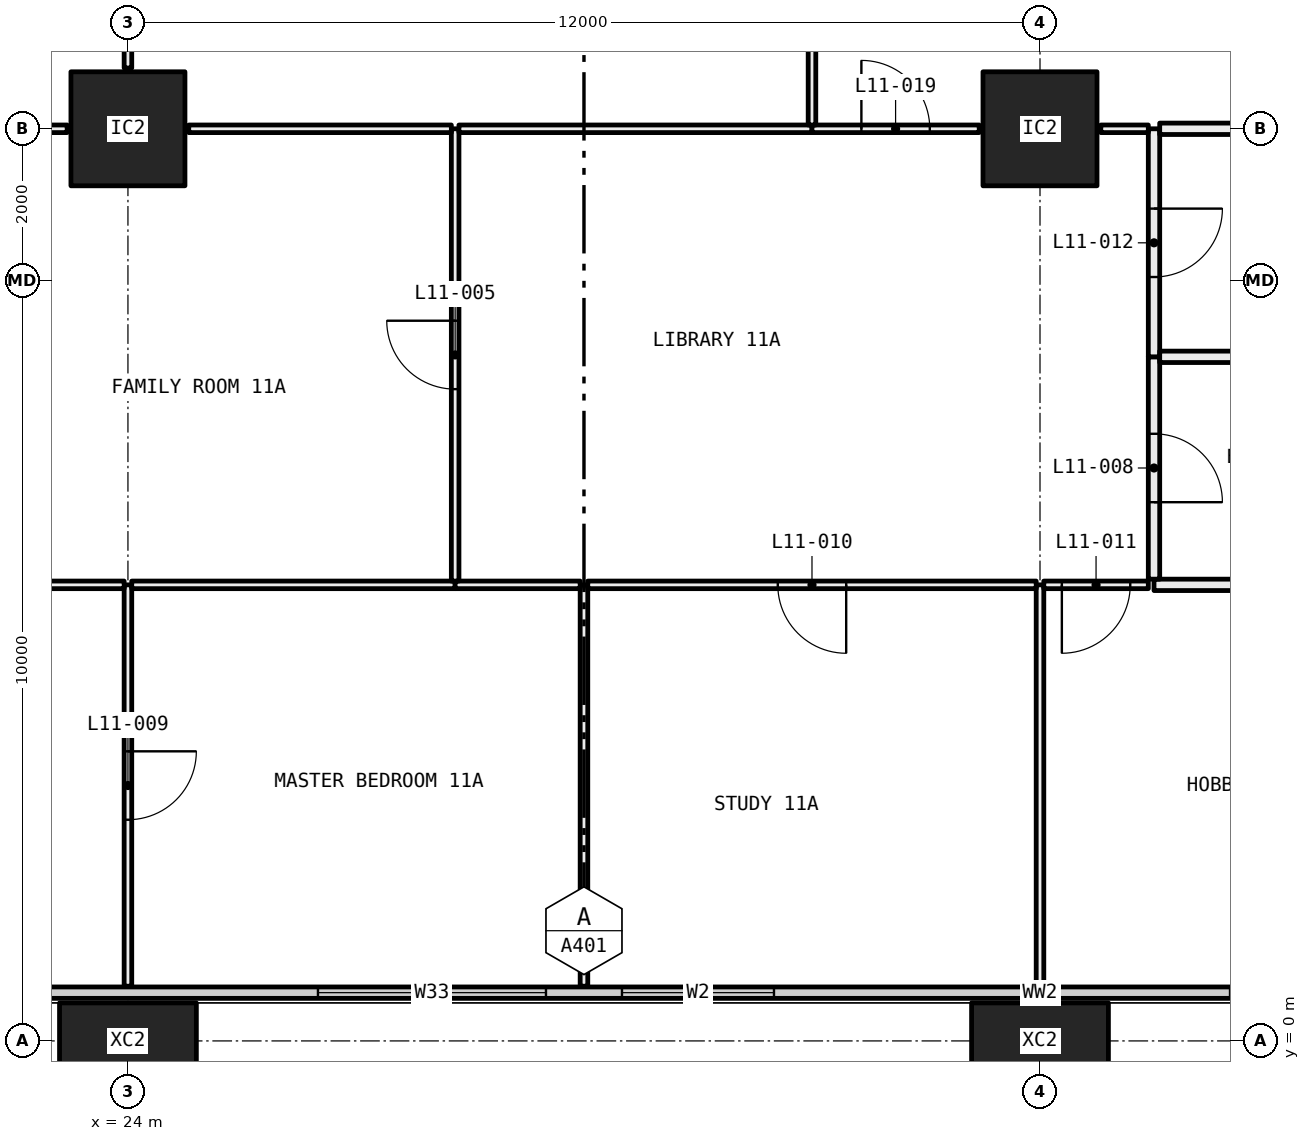
"""IFC4 building model, lengths in metres.
Left out: names, types, materials, properties, quantities, classifications, styles, units other than length and angle.
Written with IfcOpenShell. Run it as: python <this file> out.ifc"""

import sys

from ifc_helpers import new_model, si_unit, direction, frame, frame_2d, origin, origin_2d, place, context, subcontext, project, spatial, rectangle, hollow_rectangle, extrude, element, fill, save


model = new_model("IFC4")
c1 = context("Model", 3, precision=1e-05, world=origin(), true_north=direction((0.0, 1.0)))
c2 = subcontext(c1, "Body", "Model", "MODEL_VIEW")
j1 = project(units=[si_unit("LENGTHUNIT", "METRE"), si_unit("PLANEANGLEUNIT", "RADIAN")], contexts=[c1])
p1 = place(None, origin())
s1 = spatial("IfcSite", under=j1, at=p1, CompositionType="ELEMENT")
p2 = place(p1, origin())
s2 = spatial("IfcBuilding", under=s1, at=p2, CompositionType="ELEMENT")
p3 = place(p2, frame((0.0, 0.0, 50.7)))
s3 = spatial("IfcBuildingStorey", under=s2, at=p3, CompositionType="ELEMENT", Elevation=50.7)
p4 = place(p3, frame((24.0, 0.0, -0.4), z_axis=(0.0, 0.0, 1.0), x_axis=(1.0, 0.0, 0.0)))
e1 = element("IfcColumn", 1, at=p4, inside=s3, PredefinedType="COLUMN", context=c2, shape_type="SweptSolid", body=[
    extrude(hollow_rectangle(XDim=1.8, YDim=1.0, WallThickness=0.07, at=origin_2d()), origin(), (0.0, 0.0, 1.0), 3.45),
])
p5 = place(p3, frame((24.0, 12.0, 0.0), z_axis=(0.0, 0.0, 1.0), x_axis=(1.0, 0.0, 0.0)))
e2 = element("IfcColumn", 2, at=p5, inside=s3, PredefinedType="COLUMN", context=c2, shape_type="SweptSolid", body=[
    extrude(hollow_rectangle(XDim=1.5, YDim=1.5, WallThickness=0.065, at=origin_2d()), origin(), (0.0, 0.0, 1.0), 3.05),
])
p6 = place(p3, frame((36.0, 0.0, -0.4), z_axis=(0.0, 0.0, 1.0), x_axis=(1.0, 0.0, 0.0)))
e3 = element("IfcColumn", 3, at=p6, inside=s3, PredefinedType="COLUMN", context=c2, shape_type="SweptSolid", body=[
    extrude(hollow_rectangle(XDim=1.8, YDim=1.0, WallThickness=0.07, at=origin_2d()), origin(), (0.0, 0.0, 1.0), 3.45),
])
p7 = place(p3, frame((36.0, 12.0, 0.0), z_axis=(0.0, 0.0, 1.0), x_axis=(1.0, 0.0, 0.0)))
e4 = element("IfcColumn", 4, at=p7, inside=s3, PredefinedType="COLUMN", context=c2, shape_type="SweptSolid", body=[
    extrude(hollow_rectangle(XDim=1.5, YDim=1.5, WallThickness=0.065, at=origin_2d()), origin(), (0.0, 0.0, 1.0), 3.05),
])
p8 = place(p3, frame((6.56, 0.635, 0.0), z_axis=(0.0, 0.0, 1.0), x_axis=(1.0, 0.0, 0.0)))
e5 = element("IfcWall", 5, at=p8, inside=s3, PredefinedType="ELEMENTEDWALL", context=c2, shape_type="SweptSolid", body=[
    extrude(rectangle(XDim=58.88, YDim=0.15, at=frame_2d((29.44, 0.0))), origin(), (0.0, 0.0, 1.0), 3.05),
])
p9 = place(p8, frame((0.44, 0.0, 0.45)))
e6 = element("IfcOpeningElement", 6, at=p9, cuts=e5, PredefinedType="OPENING", context=c2, shape_type="SweptSolid", body=[
    extrude(rectangle(XDim=4.5, YDim=2.55, at=frame_2d((2.25, 1.275))), frame((0.0, 0.085, 0.0), z_axis=(0.0, -1.0, 0.0), x_axis=(1.0, 0.0, 0.0)), (0.0, 0.0, 1.0), 0.17),
])
p10 = place(p8, frame((7.94, 0.0, 0.45)))
e7 = element("IfcOpeningElement", 7, at=p10, cuts=e5, PredefinedType="OPENING", context=c2, shape_type="SweptSolid", body=[
    extrude(rectangle(XDim=3.0, YDim=2.55, at=frame_2d((1.5, 1.275))), frame((0.0, 0.085, 0.0), z_axis=(0.0, -1.0, 0.0), x_axis=(1.0, 0.0, 0.0)), (0.0, 0.0, 1.0), 0.17),
])
p11 = place(p8, frame((11.94, 0.0, 0.45)))
e8 = element("IfcOpeningElement", 8, at=p11, cuts=e5, PredefinedType="OPENING", context=c2, shape_type="SweptSolid", body=[
    extrude(rectangle(XDim=3.0, YDim=2.55, at=frame_2d((1.5, 1.275))), frame((0.0, 0.085, 0.0), z_axis=(0.0, -1.0, 0.0), x_axis=(1.0, 0.0, 0.0)), (0.0, 0.0, 1.0), 0.17),
])
p12 = place(p8, frame((19.94, 0.0, 0.45)))
e9 = element("IfcOpeningElement", 9, at=p12, cuts=e5, PredefinedType="OPENING", context=c2, shape_type="SweptSolid", body=[
    extrude(rectangle(XDim=3.0, YDim=2.55, at=frame_2d((1.5, 1.275))), frame((0.0, 0.085, 0.0), z_axis=(0.0, -1.0, 0.0), x_axis=(1.0, 0.0, 0.0)), (0.0, 0.0, 1.0), 0.17),
])
p13 = place(p8, frame((23.94, 0.0, 0.45)))
e10 = element("IfcOpeningElement", 10, at=p13, cuts=e5, PredefinedType="OPENING", context=c2, shape_type="SweptSolid", body=[
    extrude(rectangle(XDim=2.0, YDim=2.55, at=frame_2d((1.0, 1.275))), frame((0.0, 0.085, 0.0), z_axis=(0.0, -1.0, 0.0), x_axis=(1.0, 0.0, 0.0)), (0.0, 0.0, 1.0), 0.17),
])
p14 = place(p8, frame((31.94, 0.0, 0.45)))
e11 = element("IfcOpeningElement", 11, at=p14, cuts=e5, PredefinedType="OPENING", context=c2, shape_type="SweptSolid", body=[
    extrude(rectangle(XDim=3.0, YDim=2.55, at=frame_2d((1.5, 1.275))), frame((0.0, 0.085, 0.0), z_axis=(0.0, -1.0, 0.0), x_axis=(1.0, 0.0, 0.0)), (0.0, 0.0, 1.0), 0.17),
])
p15 = place(p8, frame((35.94, 0.0, 0.45)))
e12 = element("IfcOpeningElement", 12, at=p15, cuts=e5, PredefinedType="OPENING", context=c2, shape_type="SweptSolid", body=[
    extrude(rectangle(XDim=3.0, YDim=2.55, at=frame_2d((1.5, 1.275))), frame((0.0, 0.085, 0.0), z_axis=(0.0, -1.0, 0.0), x_axis=(1.0, 0.0, 0.0)), (0.0, 0.0, 1.0), 0.17),
])
p16 = place(p8, frame((43.94, 0.0, 0.45)))
e13 = element("IfcOpeningElement", 13, at=p16, cuts=e5, PredefinedType="OPENING", context=c2, shape_type="SweptSolid", body=[
    extrude(rectangle(XDim=3.0, YDim=2.55, at=frame_2d((1.5, 1.275))), frame((0.0, 0.085, 0.0), z_axis=(0.0, -1.0, 0.0), x_axis=(1.0, 0.0, 0.0)), (0.0, 0.0, 1.0), 0.17),
])
p17 = place(p8, frame((47.94, 0.0, 0.45)))
e14 = element("IfcOpeningElement", 14, at=p17, cuts=e5, PredefinedType="OPENING", context=c2, shape_type="SweptSolid", body=[
    extrude(rectangle(XDim=2.0, YDim=2.55, at=frame_2d((1.0, 1.275))), frame((0.0, 0.085, 0.0), z_axis=(0.0, -1.0, 0.0), x_axis=(1.0, 0.0, 0.0)), (0.0, 0.0, 1.0), 0.17),
])
p18 = place(p8, frame((53.94, 0.0, 0.45)))
e15 = element("IfcOpeningElement", 15, at=p18, cuts=e5, PredefinedType="OPENING", context=c2, shape_type="SweptSolid", body=[
    extrude(rectangle(XDim=4.5, YDim=2.55, at=frame_2d((2.25, 1.275))), frame((0.0, 0.085, 0.0), z_axis=(0.0, -1.0, 0.0), x_axis=(1.0, 0.0, 0.0)), (0.0, 0.0, 1.0), 0.17),
])
p19 = place(p3, frame((24.0, 0.72, 0.0), z_axis=(0.0, 0.0, 1.0), x_axis=(0.0, 1.0, 0.0)))
e16 = element("IfcWall", 16, at=p19, inside=s3, PredefinedType="PARTITIONING", context=c2, shape_type="SweptSolid", body=[
    extrude(rectangle(XDim=5.28, YDim=0.1, at=frame_2d((2.64, 0.0))), origin(), (0.0, 0.0, 1.0), 2.45),
])
p20 = place(p19, frame((2.19, 0.0, 0.0)))
e17 = element("IfcOpeningElement", 17, at=p20, cuts=e16, PredefinedType="OPENING", context=c2, shape_type="SweptSolid", body=[
    extrude(rectangle(XDim=0.9, YDim=2.1, at=frame_2d((0.45, 1.05))), frame((0.0, 0.06, 0.0), z_axis=(0.0, -1.0, 0.0), x_axis=(1.0, 0.0, 0.0)), (0.0, 0.0, 1.0), 0.12),
])
p21 = place(p3, frame((23.95, 6.0, 0.0), z_axis=(0.0, 0.0, 1.0), x_axis=(-1.0, 0.0, 0.0)))
e18 = element("IfcWall", 18, at=p21, inside=s3, PredefinedType="PARTITIONING", context=c2, shape_type="SweptSolid", body=[
    extrude(rectangle(XDim=4.84, YDim=0.1, at=frame_2d((2.42, 0.0))), origin(), (0.0, 0.0, 1.0), 2.45),
])
p22 = place(p21, frame((1.97, 0.0, 0.0)))
e19 = element("IfcOpeningElement", 19, at=p22, cuts=e18, PredefinedType="OPENING", context=c2, shape_type="SweptSolid", body=[
    extrude(rectangle(XDim=0.9, YDim=2.1, at=frame_2d((0.45, 1.05))), frame((0.0, 0.06, 0.0), z_axis=(0.0, -1.0, 0.0), x_axis=(1.0, 0.0, 0.0)), (0.0, 0.0, 1.0), 0.12),
])
p23 = place(p3, frame((30.0, 0.72, 0.0), z_axis=(0.0, 0.0, 1.0), x_axis=(0.0, 1.0, 0.0)))
e20 = element("IfcWall", 20, at=p23, inside=s3, PredefinedType="PARTITIONING", context=c2, shape_type="SweptSolid", body=[
    extrude(rectangle(XDim=5.28, YDim=0.1, at=frame_2d((2.64, 0.0))), origin(), (0.0, 0.0, 1.0), 3.05),
])
p24 = place(p3, frame((28.305, 6.0, 0.0), z_axis=(0.0, 0.0, 1.0), x_axis=(-1.0, 0.0, 0.0)))
e21 = element("IfcWall", 21, at=p24, inside=s3, PredefinedType="PARTITIONING", context=c2, shape_type="SweptSolid", body=[
    extrude(rectangle(XDim=4.255, YDim=0.1, at=frame_2d((2.127, 0.0))), origin(), (0.0, 0.0, 1.0), 2.45),
])
p25 = place(p3, frame((29.95, 6.0, 0.0), z_axis=(0.0, 0.0, 1.0), x_axis=(-1.0, 0.0, 0.0)))
e22 = element("IfcWall", 22, at=p25, inside=s3, PredefinedType="PARTITIONING", context=c2, shape_type="SweptSolid", body=[
    extrude(rectangle(XDim=1.645, YDim=0.1, at=frame_2d((0.823, 0.0))), origin(), (0.0, 0.0, 1.0), 3.05),
])
p26 = place(p3, frame((36.0, 0.72, 0.0), z_axis=(0.0, 0.0, 1.0), x_axis=(0.0, 1.0, 0.0)))
e23 = element("IfcWall", 23, at=p26, inside=s3, PredefinedType="PARTITIONING", context=c2, shape_type="SweptSolid", body=[
    extrude(rectangle(XDim=5.28, YDim=0.1, at=frame_2d((2.64, 0.0))), origin(), (0.0, 0.0, 1.0), 2.45),
])
p27 = place(p3, frame((35.95, 6.0, 0.0), z_axis=(0.0, 0.0, 1.0), x_axis=(-1.0, 0.0, 0.0)))
e24 = element("IfcWall", 24, at=p27, inside=s3, PredefinedType="PARTITIONING", context=c2, shape_type="SweptSolid", body=[
    extrude(rectangle(XDim=5.9, YDim=0.1, at=frame_2d((2.95, 0.0))), origin(), (0.0, 0.0, 1.0), 2.45),
])
p28 = place(p27, frame((2.5, 0.0, 0.0)))
e25 = element("IfcOpeningElement", 25, at=p28, cuts=e24, PredefinedType="OPENING", context=c2, shape_type="SweptSolid", body=[
    extrude(rectangle(XDim=0.9, YDim=2.1, at=frame_2d((0.45, 1.05))), frame((0.0, 0.06, 0.0), z_axis=(0.0, -1.0, 0.0), x_axis=(1.0, 0.0, 0.0)), (0.0, 0.0, 1.0), 0.12),
])
p29 = place(p3, frame((37.425, 6.0, 0.0), z_axis=(0.0, 0.0, 1.0), x_axis=(-1.0, 0.0, 0.0)))
e26 = element("IfcWall", 26, at=p29, inside=s3, PredefinedType="PARTITIONING", context=c2, shape_type="SweptSolid", body=[
    extrude(rectangle(XDim=1.375, YDim=0.1, at=frame_2d((0.688, 0.0))), origin(), (0.0, 0.0, 1.0), 2.45),
])
p30 = place(p29, frame((0.238, 0.0, 0.0)))
e27 = element("IfcOpeningElement", 27, at=p30, cuts=e26, PredefinedType="OPENING", context=c2, shape_type="SweptSolid", body=[
    extrude(rectangle(XDim=0.9, YDim=2.1, at=frame_2d((0.45, 1.05))), frame((0.0, 0.06, 0.0), z_axis=(0.0, -1.0, 0.0), x_axis=(1.0, 0.0, 0.0)), (0.0, 0.0, 1.0), 0.12),
])
p31 = place(p3, frame((41.9, 6.0, 0.0), z_axis=(0.0, 0.0, 1.0), x_axis=(-1.0, 0.0, 0.0)))
e28 = element("IfcWall", 28, at=p31, inside=s3, PredefinedType="PARTITIONING", context=c2, shape_type="SweptSolid", body=[
    extrude(rectangle(XDim=4.4, YDim=0.15, at=frame_2d((2.2, 0.0))), origin(), (0.0, 0.0, 1.0), 3.05),
])
p32 = place(p3, frame((28.305, 6.05, 0.0), z_axis=(0.0, 0.0, 1.0), x_axis=(0.0, 1.0, 0.0)))
e29 = element("IfcWall", 29, at=p32, inside=s3, PredefinedType="PARTITIONING", context=c2, shape_type="SweptSolid", body=[
    extrude(rectangle(XDim=5.95, YDim=0.1, at=frame_2d((2.975, 0.0))), origin(), (0.0, 0.0, 1.0), 2.45),
])
p33 = place(p32, frame((2.525, 0.0, 0.0)))
e30 = element("IfcOpeningElement", 30, at=p33, cuts=e29, PredefinedType="OPENING", context=c2, shape_type="SweptSolid", body=[
    extrude(rectangle(XDim=0.9, YDim=2.1, at=frame_2d((0.45, 1.05))), frame((0.0, 0.06, 0.0), z_axis=(0.0, -1.0, 0.0), x_axis=(1.0, 0.0, 0.0)), (0.0, 0.0, 1.0), 0.12),
])
p34 = place(p3, frame((23.2, 12.0, 0.0), z_axis=(0.0, 0.0, 1.0), x_axis=(-1.0, 0.0, 0.0)))
e31 = element("IfcWall", 31, at=p34, inside=s3, PredefinedType="PARTITIONING", context=c2, shape_type="SweptSolid", body=[
    extrude(rectangle(XDim=3.7, YDim=0.1, at=frame_2d((1.85, 0.0))), origin(), (0.0, 0.0, 1.0), 2.45),
])
p35 = place(p34, frame((1.4, 0.0, 0.0)))
e32 = element("IfcOpeningElement", 32, at=p35, cuts=e31, PredefinedType="OPENING", context=c2, shape_type="SweptSolid", body=[
    extrude(rectangle(XDim=0.9, YDim=2.1, at=frame_2d((0.45, 1.05))), frame((0.0, 0.06, 0.0), z_axis=(0.0, -1.0, 0.0), x_axis=(1.0, 0.0, 0.0)), (0.0, 0.0, 1.0), 0.12),
])
p36 = place(p3, frame((28.255, 12.0, 0.0), z_axis=(0.0, 0.0, 1.0), x_axis=(-1.0, 0.0, 0.0)))
e33 = element("IfcWall", 33, at=p36, inside=s3, PredefinedType="PARTITIONING", context=c2, shape_type="SweptSolid", body=[
    extrude(rectangle(XDim=3.455, YDim=0.1, at=frame_2d((1.728, 0.0))), origin(), (0.0, 0.0, 1.0), 2.45),
])
p37 = place(p3, frame((37.5, 6.075, 0.0), z_axis=(0.0, 0.0, 1.0), x_axis=(0.0, 1.0, 0.0)))
e34 = element("IfcWall", 34, at=p37, inside=s3, PredefinedType="PARTITIONING", context=c2, shape_type="SweptSolid", body=[
    extrude(rectangle(XDim=2.925, YDim=0.15, at=frame_2d((1.462, 0.0))), origin(), (0.0, 0.0, 1.0), 3.05),
])
p38 = place(p37, frame((1.012, 0.0, 0.0)))
e35 = element("IfcOpeningElement", 35, at=p38, cuts=e34, PredefinedType="OPENING", context=c2, shape_type="SweptSolid", body=[
    extrude(rectangle(XDim=0.9, YDim=2.1, at=frame_2d((0.45, 1.05))), frame((0.0, 0.085, 0.0), z_axis=(0.0, -1.0, 0.0), x_axis=(1.0, 0.0, 0.0)), (0.0, 0.0, 1.0), 0.17),
])
p39 = place(p3, frame((37.5, 9.0, 0.0), z_axis=(0.0, 0.0, 1.0), x_axis=(0.0, 1.0, 0.0)))
e36 = element("IfcWall", 36, at=p39, inside=s3, PredefinedType="PARTITIONING", context=c2, shape_type="SweptSolid", body=[
    extrude(rectangle(XDim=3.0, YDim=0.15, at=frame_2d((1.5, 0.0))), origin(), (0.0, 0.0, 1.0), 2.45),
])
p40 = place(p39, frame((1.05, 0.0, 0.0)))
e37 = element("IfcOpeningElement", 37, at=p40, cuts=e36, PredefinedType="OPENING", context=c2, shape_type="SweptSolid", body=[
    extrude(rectangle(XDim=0.9, YDim=2.1, at=frame_2d((0.45, 1.05))), frame((0.0, 0.085, 0.0), z_axis=(0.0, -1.0, 0.0), x_axis=(1.0, 0.0, 0.0)), (0.0, 0.0, 1.0), 0.17),
])
p41 = place(p3, frame((33.0, 12.0, 0.0), z_axis=(0.0, 0.0, 1.0), x_axis=(-1.0, 0.0, 0.0)))
e38 = element("IfcWall", 38, at=p41, inside=s3, PredefinedType="PARTITIONING", context=c2, shape_type="SweptSolid", body=[
    extrude(rectangle(XDim=4.645, YDim=0.1, at=frame_2d((2.323, 0.0))), origin(), (0.0, 0.0, 1.0), 2.45),
])
p42 = place(p3, frame((35.2, 12.0, 0.0), z_axis=(0.0, 0.0, 1.0), x_axis=(-1.0, 0.0, 0.0)))
e39 = element("IfcWall", 39, at=p42, inside=s3, PredefinedType="PARTITIONING", context=c2, shape_type="SweptSolid", body=[
    extrude(rectangle(XDim=2.2, YDim=0.1, at=frame_2d((1.1, 0.0))), origin(), (0.0, 0.0, 1.0), 2.45),
])
p43 = place(p42, frame((0.65, 0.0, 0.0)))
e40 = element("IfcOpeningElement", 40, at=p43, cuts=e39, PredefinedType="OPENING", context=c2, shape_type="SweptSolid", body=[
    extrude(rectangle(XDim=0.9, YDim=2.1, at=frame_2d((0.45, 1.05))), frame((0.0, 0.06, 0.0), z_axis=(0.0, -1.0, 0.0), x_axis=(1.0, 0.0, 0.0)), (0.0, 0.0, 1.0), 0.12),
])
p44 = place(p3, frame((37.425, 12.0, 0.0), z_axis=(0.0, 0.0, 1.0), x_axis=(-1.0, 0.0, 0.0)))
e41 = element("IfcWall", 41, at=p44, inside=s3, PredefinedType="PARTITIONING", context=c2, shape_type="SweptSolid", body=[
    extrude(rectangle(XDim=0.625, YDim=0.1, at=frame_2d((0.312, 0.0))), origin(), (0.0, 0.0, 1.0), 2.45),
])
p45 = place(p3, frame((41.9, 9.0, 0.0), z_axis=(0.0, 0.0, 1.0), x_axis=(-1.0, 0.0, 0.0)))
e42 = element("IfcWall", 42, at=p45, inside=s3, PredefinedType="PARTITIONING", context=c2, shape_type="SweptSolid", body=[
    extrude(rectangle(XDim=4.325, YDim=0.15, at=frame_2d((2.163, 0.0))), origin(), (0.0, 0.0, 1.0), 3.05),
])
p46 = place(p3, frame((41.9, 12.0, 0.0), z_axis=(0.0, 0.0, 1.0), x_axis=(-1.0, 0.0, 0.0)))
e43 = element("IfcWall", 43, at=p46, inside=s3, PredefinedType="PARTITIONING", context=c2, shape_type="SweptSolid", body=[
    extrude(rectangle(XDim=4.325, YDim=0.15, at=frame_2d((2.163, 0.0))), origin(), (0.0, 0.0, 1.0), 2.45),
])
p47 = place(p3, frame((24.0, 12.8, 0.0), z_axis=(0.0, 0.0, 1.0), x_axis=(0.0, 1.0, 0.0)))
e44 = element("IfcWall", 44, at=p47, inside=s3, PredefinedType="PARTITIONING", context=c2, shape_type="SweptSolid", body=[
    extrude(rectangle(XDim=5.1, YDim=0.1, at=frame_2d((2.55, 0.0))), origin(), (0.0, 0.0, 1.0), 3.05),
])
p48 = place(p47, frame((2.1, 0.0, 0.0)))
e45 = element("IfcOpeningElement", 45, at=p48, cuts=e44, PredefinedType="OPENING", context=c2, shape_type="SweptSolid", body=[
    extrude(rectangle(XDim=0.9, YDim=2.1, at=frame_2d((0.45, 1.05))), frame((0.0, 0.06, 0.0), z_axis=(0.0, -1.0, 0.0), x_axis=(1.0, 0.0, 0.0)), (0.0, 0.0, 1.0), 0.12),
])
p49 = place(p3, frame((33.0, 12.05, 0.0), z_axis=(0.0, 0.0, 1.0), x_axis=(0.0, 1.0, 0.0)))
e46 = element("IfcWall", 46, at=p49, inside=s3, PredefinedType="PARTITIONING", context=c2, shape_type="SweptSolid", body=[
    extrude(rectangle(XDim=5.85, YDim=0.1, at=frame_2d((2.925, 0.0))), origin(), (0.0, 0.0, 1.0), 2.45),
])
p50 = place(p12, origin())
e47 = element("IfcWindow", 47, at=p50, inside=s3, PartitioningType="SINGLE_PANEL", PredefinedType="WINDOW", context=c2, shape_type="SweptSolid", body=[
    extrude(rectangle(XDim=3.0, YDim=2.55, at=frame_2d((1.5, 1.275))), frame((0.0, 0.03, 0.0), z_axis=(0.0, -1.0, 0.0), x_axis=(1.0, 0.0, 0.0)), (0.0, 0.0, 1.0), 0.06),
])
fill(e9, e47)
p51 = place(p13, origin())
e48 = element("IfcWindow", 48, at=p51, inside=s3, PartitioningType="SINGLE_PANEL", PredefinedType="WINDOW", context=c2, shape_type="SweptSolid", body=[
    extrude(rectangle(XDim=2.0, YDim=2.55, at=frame_2d((1.0, 1.275))), frame((0.0, 0.03, 0.0), z_axis=(0.0, -1.0, 0.0), x_axis=(1.0, 0.0, 0.0)), (0.0, 0.0, 1.0), 0.06),
])
fill(e10, e48)
p52 = place(p33, origin())
e49 = element("IfcDoor", 49, at=p52, inside=s3, OperationType="SINGLE_SWING_LEFT", PredefinedType="DOOR", context=c2, shape_type="SweptSolid", body=[
    extrude(rectangle(XDim=0.9, YDim=2.1, at=frame_2d((0.45, 1.05))), frame((0.0, 0.025, 0.0), z_axis=(0.0, -1.0, 0.0), x_axis=(1.0, 0.0, 0.0)), (0.0, 0.0, 1.0), 0.05),
])
fill(e30, e49)
p53 = place(p38, frame((0.9, 0.0, 0.0), x_axis=(-1.0, 0.0, 0.0)))
e50 = element("IfcDoor", 50, at=p53, inside=s3, OperationType="SINGLE_SWING_LEFT", PredefinedType="DOOR", context=c2, shape_type="SweptSolid", body=[
    extrude(rectangle(XDim=0.9, YDim=2.1, at=frame_2d((0.45, 1.05))), frame((0.0, 0.025, 0.0), z_axis=(0.0, -1.0, 0.0), x_axis=(1.0, 0.0, 0.0)), (0.0, 0.0, 1.0), 0.05),
])
fill(e35, e50)
p54 = place(p20, frame((0.9, 0.0, 0.0), x_axis=(-1.0, 0.0, 0.0)))
e51 = element("IfcDoor", 51, at=p54, inside=s3, OperationType="SINGLE_SWING_RIGHT", PredefinedType="DOOR", context=c2, shape_type="SweptSolid", body=[
    extrude(rectangle(XDim=0.9, YDim=2.1, at=frame_2d((0.45, 1.05))), frame((0.0, 0.025, 0.0), z_axis=(0.0, -1.0, 0.0), x_axis=(1.0, 0.0, 0.0)), (0.0, 0.0, 1.0), 0.05),
])
fill(e17, e51)
p55 = place(p28, origin())
e52 = element("IfcDoor", 52, at=p55, inside=s3, OperationType="SINGLE_SWING_RIGHT", PredefinedType="DOOR", context=c2, shape_type="SweptSolid", body=[
    extrude(rectangle(XDim=0.9, YDim=2.1, at=frame_2d((0.45, 1.05))), frame((0.0, 0.025, 0.0), z_axis=(0.0, -1.0, 0.0), x_axis=(1.0, 0.0, 0.0)), (0.0, 0.0, 1.0), 0.05),
])
fill(e25, e52)
p56 = place(p30, origin())
e53 = element("IfcDoor", 53, at=p56, inside=s3, OperationType="SINGLE_SWING_LEFT", PredefinedType="DOOR", context=c2, shape_type="SweptSolid", body=[
    extrude(rectangle(XDim=0.9, YDim=2.1, at=frame_2d((0.45, 1.05))), frame((0.0, 0.025, 0.0), z_axis=(0.0, -1.0, 0.0), x_axis=(1.0, 0.0, 0.0)), (0.0, 0.0, 1.0), 0.05),
])
fill(e27, e53)
p57 = place(p40, frame((0.9, 0.0, 0.0), x_axis=(-1.0, 0.0, 0.0)))
e54 = element("IfcDoor", 54, at=p57, inside=s3, OperationType="SINGLE_SWING_RIGHT", PredefinedType="DOOR", context=c2, shape_type="SweptSolid", body=[
    extrude(rectangle(XDim=0.9, YDim=2.1, at=frame_2d((0.45, 1.05))), frame((0.0, 0.025, 0.0), z_axis=(0.0, -1.0, 0.0), x_axis=(1.0, 0.0, 0.0)), (0.0, 0.0, 1.0), 0.05),
])
fill(e37, e54)
p58 = place(p43, frame((0.9, 0.0, 0.0), x_axis=(-1.0, 0.0, 0.0)))
e55 = element("IfcDoor", 55, at=p58, inside=s3, OperationType="SINGLE_SWING_RIGHT", PredefinedType="DOOR", context=c2, shape_type="SweptSolid", body=[
    extrude(rectangle(XDim=0.9, YDim=2.1, at=frame_2d((0.45, 1.05))), frame((0.0, 0.025, 0.0), z_axis=(0.0, -1.0, 0.0), x_axis=(1.0, 0.0, 0.0)), (0.0, 0.0, 1.0), 0.05),
])
fill(e40, e55)
save(model, sys.argv[1])
